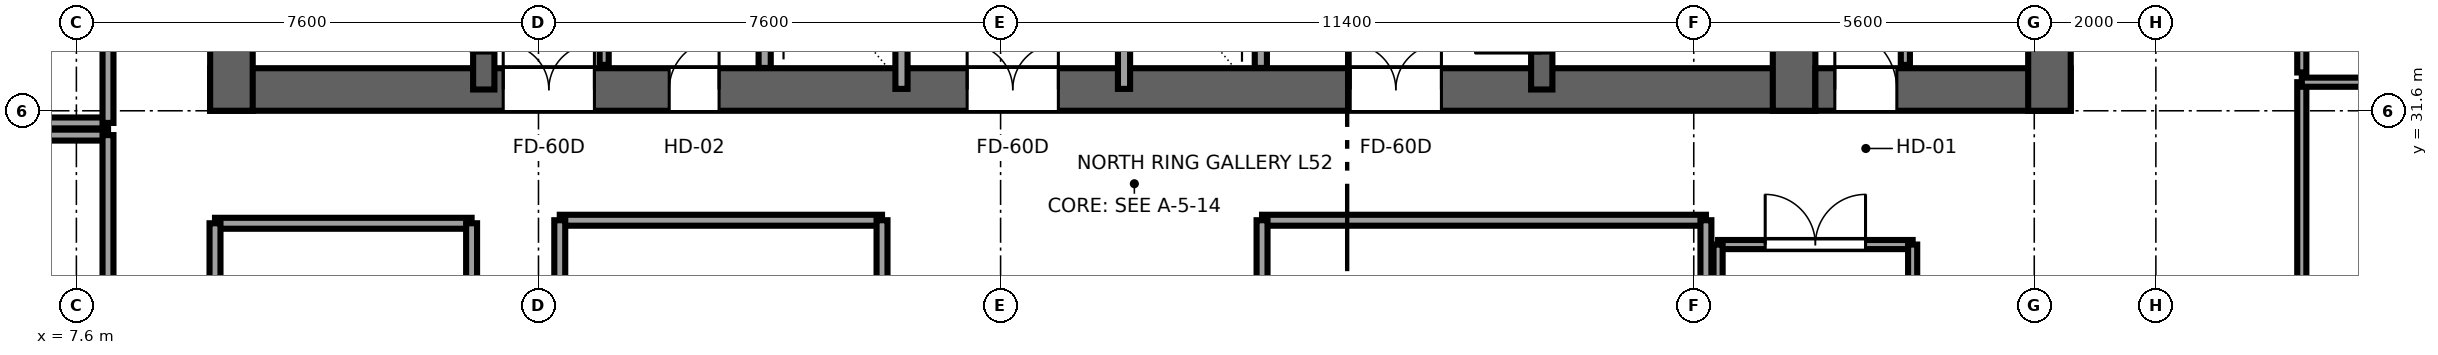
"""IFC4 building model, lengths in metres.
Left out: names, types, materials, properties, quantities, classifications, styles, units other than length and angle.
Written with IfcOpenShell. Run it as: python <this file> out.ifc"""

import sys

from ifc_helpers import new_model, si_unit, direction, frame, frame_2d, origin, place, context, subcontext, project, spatial, rectangle, extrude, source, transform, mapped, element, fill, save


model = new_model("IFC4")
c1 = context("Model", 3, precision=1e-05, world=origin(), true_north=direction((0.0, 1.0)))
c2 = subcontext(c1, "Body", "Model", "MODEL_VIEW")
j1 = project(units=[si_unit("LENGTHUNIT", "METRE"), si_unit("PLANEANGLEUNIT", "RADIAN")], contexts=[c1])
p1 = place(None, origin())
s1 = spatial("IfcSite", under=j1, at=p1, CompositionType="ELEMENT")
p2 = place(p1, origin())
s2 = spatial("IfcBuilding", under=s1, at=p2, CompositionType="ELEMENT")
p3 = place(p2, frame((0.0, 0.0, 198.2)))
s3 = spatial("IfcBuildingStorey", under=s2, at=p3, CompositionType="ELEMENT", Elevation=198.2)
p4 = place(p3, frame((9.8, 31.95, 0.0), z_axis=(0.0, 0.0, 1.0), x_axis=(1.0, 0.0, 0.0)))
e1 = element("IfcWall", 1, at=p4, inside=s3, PredefinedType="SHEAR", context=c2, shape_type="SweptSolid", body=[
    extrude(rectangle(XDim=26.4, YDim=0.7, at=frame_2d((13.2, 0.0))), origin(), (0.0, 0.0, 1.0), 3.55),
])
p5 = place(p4, frame((6.32, 0.0, 0.0), z_axis=(0.0, 0.0, 1.0), x_axis=(-1.0, 0.0, 0.0)))
e2 = element("IfcOpeningElement", 2, at=p5, cuts=e1, PredefinedType="OPENING", context=c2, shape_type="SweptSolid", body=[
    extrude(rectangle(XDim=1.5, YDim=2.04, at=frame_2d((0.75, 1.02))), frame((0.0, 0.36, 0.0), z_axis=(0.0, -1.0, 0.0), x_axis=(1.0, 0.0, 0.0)), (0.0, 0.0, 1.0), 0.72),
])
p6 = place(p4, frame((13.95, 0.0, 0.0), z_axis=(0.0, 0.0, 1.0), x_axis=(-1.0, 0.0, 0.0)))
e3 = element("IfcOpeningElement", 3, at=p6, cuts=e1, PredefinedType="OPENING", context=c2, shape_type="SweptSolid", body=[
    extrude(rectangle(XDim=1.5, YDim=2.04, at=frame_2d((0.75, 1.02))), frame((0.0, 0.36, 0.0), z_axis=(0.0, -1.0, 0.0), x_axis=(1.0, 0.0, 0.0)), (0.0, 0.0, 1.0), 0.72),
])
p7 = place(p4, frame((20.25, 0.0, 0.0), z_axis=(0.0, 0.0, 1.0), x_axis=(-1.0, 0.0, 0.0)))
e4 = element("IfcOpeningElement", 4, at=p7, cuts=e1, PredefinedType="OPENING", context=c2, shape_type="SweptSolid", body=[
    extrude(rectangle(XDim=1.5, YDim=2.04, at=frame_2d((0.75, 1.02))), frame((0.0, 0.36, 0.0), z_axis=(0.0, -1.0, 0.0), x_axis=(1.0, 0.0, 0.0)), (0.0, 0.0, 1.0), 0.72),
])
p8 = place(p4, frame((8.37, 0.0, 0.0), z_axis=(0.0, 0.0, 1.0), x_axis=(-1.0, 0.0, 0.0)))
e5 = element("IfcOpeningElement", 5, at=p8, cuts=e1, PredefinedType="OPENING", context=c2, shape_type="SweptSolid", body=[
    extrude(rectangle(XDim=0.82, YDim=2.01, at=frame_2d((0.41, 1.005))), frame((0.0, 0.36, 0.0), z_axis=(0.0, -1.0, 0.0), x_axis=(1.0, 0.0, 0.0)), (0.0, 0.0, 1.0), 0.72),
])
for number, where, z_axis, x_axis in (
    (6, (10.15, 31.6, 0.0), (0.0, 0.0, 1.0), (0.0, 1.0, 0.0)),
    (7, (35.85, 31.6, 0.0), (0.0, 0.0, 1.0), (0.0, 1.0, 0.0)),
):
    element("IfcWall", number, at=place(p3, frame(where, z_axis=z_axis, x_axis=x_axis)), inside=s3, PredefinedType="SHEAR", context=c2, shape_type="SweptSolid", body=[
        extrude(rectangle(XDim=13.6, YDim=0.7, at=frame_2d((6.8, 0.0))), origin(), (0.0, 0.0, 1.0), 3.55),
    ])
p9 = place(p3, frame((14.3, 31.95, 0.0), z_axis=(0.0, 0.0, 1.0), x_axis=(0.0, 1.0, 0.0)))
e8 = element("IfcWall", 8, at=p9, inside=s3, PredefinedType="SHEAR", context=c2, shape_type="SweptSolid", body=[
    extrude(rectangle(XDim=12.9, YDim=0.35, at=frame_2d((6.45, 0.0))), origin(), (0.0, 0.0, 1.0), 3.55),
])
p10 = place(p9, frame((0.6, 0.0, 0.0)))
e9 = element("IfcOpeningElement", 9, at=p10, cuts=e8, PredefinedType="OPENING", context=c2, shape_type="SweptSolid", body=[
    extrude(rectangle(XDim=1.1, YDim=2.12, at=frame_2d((0.55, 1.06))), frame((0.0, 0.185, 0.0), z_axis=(0.0, -1.0, 0.0), x_axis=(1.0, 0.0, 0.0)), (0.0, 0.0, 1.0), 0.37),
])
p11 = place(p3, frame((31.7, 31.95, 0.0), z_axis=(0.0, 0.0, 1.0), x_axis=(0.0, 1.0, 0.0)))
e10 = element("IfcWall", 10, at=p11, inside=s3, PredefinedType="SHEAR", context=c2, shape_type="SweptSolid", body=[
    extrude(rectangle(XDim=12.9, YDim=0.35, at=frame_2d((6.45, 0.0))), origin(), (0.0, 0.0, 1.0), 3.55),
])
p12 = place(p11, frame((1.7, 0.0, 0.0), z_axis=(0.0, 0.0, 1.0), x_axis=(-1.0, 0.0, 0.0)))
e11 = element("IfcOpeningElement", 11, at=p12, cuts=e10, PredefinedType="OPENING", context=c2, shape_type="SweptSolid", body=[
    extrude(rectangle(XDim=1.1, YDim=2.12, at=frame_2d((0.55, 1.06))), frame((0.0, 0.185, 0.0), z_axis=(0.0, -1.0, 0.0), x_axis=(1.0, 0.0, 0.0)), (0.0, 0.0, 1.0), 0.37),
])
p13 = place(p3, frame((36.2, 31.95, 0.0), z_axis=(0.0, 0.0, 1.0), x_axis=(1.0, 0.0, 0.0)))
e12 = element("IfcWall", 12, at=p13, inside=s3, PredefinedType="SHEAR", context=c2, shape_type="SweptSolid", body=[
    extrude(rectangle(XDim=4.2, YDim=0.7, at=frame_2d((2.1, 0.0))), origin(), (0.0, 0.0, 1.0), 3.55),
])
p14 = place(p13, frame((1.34, 0.0, 0.0), z_axis=(0.0, 0.0, 1.0), x_axis=(-1.0, 0.0, 0.0)))
e13 = element("IfcOpeningElement", 13, at=p14, cuts=e12, PredefinedType="OPENING", context=c2, shape_type="SweptSolid", body=[
    extrude(rectangle(XDim=1.02, YDim=2.03, at=frame_2d((0.51, 1.015))), frame((0.0, 0.36, 0.0), z_axis=(0.0, -1.0, 0.0), x_axis=(1.0, 0.0, 0.0)), (0.0, 0.0, 1.0), 0.72),
])
p15 = place(p3, frame((40.05, 31.6, 0.0), z_axis=(0.0, 0.0, 1.0), x_axis=(0.0, 1.0, 0.0)))
e14 = element("IfcWall", 14, at=p15, inside=s3, PredefinedType="SHEAR", context=c2, shape_type="SweptSolid", body=[
    extrude(rectangle(XDim=13.6, YDim=0.7, at=frame_2d((6.8, 0.0))), origin(), (0.0, 0.0, 1.0), 3.55),
])
for number, where, z_axis, x_axis in (
    (15, (18.92, 32.304, 0.0), (0.0, 0.0, 1.0), (0.0, 1.0, 0.0)),
    (16, (27.08, 32.304, 0.0), (0.0, 0.0, 1.0), (0.0, 1.0, 0.0)),
):
    element("IfcWall", number, at=place(p3, frame(where, z_axis=z_axis, x_axis=x_axis)), inside=s3, PredefinedType="SOLIDWALL", context=c2, shape_type="SweptSolid", body=[
        extrude(rectangle(XDim=3.846, YDim=0.2, at=frame_2d((1.923, 0.0))), origin(), (0.0, 0.0, 1.0), 3.37),
    ])
p16 = place(p3, frame((21.17, 31.96, 0.0), z_axis=(0.0, 0.0, 1.0), x_axis=(0.0, 1.0, 0.0)))
e17 = element("IfcWall", 17, at=p16, inside=s3, PredefinedType="SOLIDWALL", context=c2, shape_type="SweptSolid", body=[
    extrude(rectangle(XDim=12.58, YDim=0.2, at=frame_2d((6.29, 0.0))), origin(), (0.0, 0.0, 1.0), 3.37),
])
p17 = place(p16, frame((5.74, 0.0, 0.0)))
e18 = element("IfcOpeningElement", 18, at=p17, cuts=e17, PredefinedType="OPENING", context=c2, shape_type="SweptSolid", body=[
    extrude(rectangle(XDim=1.1, YDim=2.12, at=frame_2d((0.55, 1.06))), frame((0.0, 0.11, 0.0), z_axis=(0.0, -1.0, 0.0), x_axis=(1.0, 0.0, 0.0)), (0.0, 0.0, 1.0), 0.22),
])
p18 = place(p16, frame((8.24, 0.0, 0.0)))
e19 = element("IfcOpeningElement", 19, at=p18, cuts=e17, PredefinedType="OPENING", context=c2, shape_type="SweptSolid", body=[
    extrude(rectangle(XDim=1.1, YDim=2.12, at=frame_2d((0.55, 1.06))), frame((0.0, 0.11, 0.0), z_axis=(0.0, -1.0, 0.0), x_axis=(1.0, 0.0, 0.0)), (0.0, 0.0, 1.0), 0.22),
])
p19 = place(p3, frame((24.83, 31.96, 0.0), z_axis=(0.0, 0.0, 1.0), x_axis=(0.0, 1.0, 0.0)))
e20 = element("IfcWall", 20, at=p19, inside=s3, PredefinedType="SOLIDWALL", context=c2, shape_type="SweptSolid", body=[
    extrude(rectangle(XDim=12.58, YDim=0.2, at=frame_2d((6.29, 0.0))), origin(), (0.0, 0.0, 1.0), 3.37),
])
p20 = place(p19, frame((5.74, 0.0, 0.0)))
e21 = element("IfcOpeningElement", 21, at=p20, cuts=e20, PredefinedType="OPENING", context=c2, shape_type="SweptSolid", body=[
    extrude(rectangle(XDim=1.1, YDim=2.12, at=frame_2d((0.55, 1.06))), frame((0.0, 0.11, 0.0), z_axis=(0.0, -1.0, 0.0), x_axis=(1.0, 0.0, 0.0)), (0.0, 0.0, 1.0), 0.22),
])
p21 = place(p19, frame((8.24, 0.0, 0.0)))
e22 = element("IfcOpeningElement", 22, at=p21, cuts=e20, PredefinedType="OPENING", context=c2, shape_type="SweptSolid", body=[
    extrude(rectangle(XDim=1.1, YDim=2.12, at=frame_2d((0.55, 1.06))), frame((0.0, 0.11, 0.0), z_axis=(0.0, -1.0, 0.0), x_axis=(1.0, 0.0, 0.0)), (0.0, 0.0, 1.0), 0.22),
])
p22 = place(p3, frame((16.28, 32.355, 0.0), z_axis=(0.0, 0.0, 1.0), x_axis=(0.0, 1.0, 0.0)))
e23 = element("IfcWall", 23, at=p22, inside=s3, PredefinedType="PARTITIONING", context=c2, shape_type="SweptSolid", body=[
    extrude(rectangle(XDim=0.865, YDim=0.15, at=frame_2d((0.433, 0.0))), origin(), (0.0, 0.0, 1.0), 3.37),
])
p23 = place(p3, frame((37.68, 32.355, 0.0), z_axis=(0.0, 0.0, 1.0), x_axis=(0.0, 1.0, 0.0)))
e24 = element("IfcWall", 24, at=p23, inside=s3, PredefinedType="PARTITIONING", context=c2, shape_type="SweptSolid", body=[
    extrude(rectangle(XDim=3.845, YDim=0.15, at=frame_2d((1.922, 0.0))), origin(), (0.0, 0.0, 1.0), 3.37),
])
p24 = place(p23, frame((1.413, 0.0, 0.0)))
e25 = element("IfcOpeningElement", 25, at=p24, cuts=e24, PredefinedType="OPENING", context=c2, shape_type="SweptSolid", body=[
    extrude(rectangle(XDim=1.02, YDim=2.03, at=frame_2d((0.51, 1.015))), frame((0.0, 0.085, 0.0), z_axis=(0.0, -1.0, 0.0), x_axis=(1.0, 0.0, 0.0)), (0.0, 0.0, 1.0), 0.17),
])
p25 = place(p3, frame((2.9, 31.2, 0.0), z_axis=(0.0, 0.0, 1.0), x_axis=(1.0, 0.0, 0.0)))
e26 = element("IfcWall", 26, at=p25, inside=s3, PredefinedType="PARTITIONING", context=c2, shape_type="SweptSolid", body=[
    extrude(rectangle(XDim=5.22, YDim=0.18, at=frame_2d((2.61, 0.0))), origin(), (0.0, 0.0, 1.0), 3.37),
])
p26 = place(p3, frame((8.12, 23.7, 0.0), z_axis=(0.0, 0.0, 1.0), x_axis=(0.0, 1.0, 0.0)))
e27 = element("IfcWall", 27, at=p26, inside=s3, PredefinedType="PARTITIONING", context=c2, shape_type="SweptSolid", body=[
    extrude(rectangle(XDim=7.5, YDim=0.18, at=frame_2d((3.75, 0.0))), origin(), (0.0, 0.0, 1.0), 3.37),
])
p27 = place(p26, frame((2.925, 0.0, 0.0)))
e28 = element("IfcOpeningElement", 28, at=p27, cuts=e27, PredefinedType="OPENING", context=c2, shape_type="SweptSolid", body=[
    extrude(rectangle(XDim=1.65, YDim=2.15, at=frame_2d((0.825, 1.075))), frame((0.0, 0.1, 0.0), z_axis=(0.0, -1.0, 0.0), x_axis=(1.0, 0.0, 0.0)), (0.0, 0.0, 1.0), 0.2),
])
p28 = place(p3, frame((2.9, 31.4, 0.0), z_axis=(0.0, 0.0, 1.0), x_axis=(1.0, 0.0, 0.0)))
e29 = element("IfcWall", 29, at=p28, inside=s3, PredefinedType="PARTITIONING", context=c2, shape_type="SweptSolid", body=[
    extrude(rectangle(XDim=5.22, YDim=0.18, at=frame_2d((2.61, 0.0))), origin(), (0.0, 0.0, 1.0), 3.37),
])
p29 = place(p3, frame((8.12, 31.4, 0.0), z_axis=(0.0, 0.0, 1.0), x_axis=(0.0, 1.0, 0.0)))
e30 = element("IfcWall", 30, at=p29, inside=s3, PredefinedType="PARTITIONING", context=c2, shape_type="SweptSolid", body=[
    extrude(rectangle(XDim=6.8, YDim=0.18, at=frame_2d((3.4, 0.0))), origin(), (0.0, 0.0, 1.0), 3.37),
])
p30 = place(p29, frame((3.175, 0.0, 0.0)))
e31 = element("IfcOpeningElement", 31, at=p30, cuts=e30, PredefinedType="OPENING", context=c2, shape_type="SweptSolid", body=[
    extrude(rectangle(XDim=1.65, YDim=2.15, at=frame_2d((0.825, 1.075))), frame((0.0, 0.1, 0.0), z_axis=(0.0, -1.0, 0.0), x_axis=(1.0, 0.0, 0.0)), (0.0, 0.0, 1.0), 0.2),
])
p31 = place(p3, frame((44.2, 23.78, 0.0), z_axis=(0.0, 0.0, 1.0), x_axis=(0.0, 1.0, 0.0)))
e32 = element("IfcWall", 32, at=p31, inside=s3, PredefinedType="PARTITIONING", context=c2, shape_type="SweptSolid", body=[
    extrude(rectangle(XDim=8.29, YDim=0.15, at=frame_2d((4.145, 0.0))), origin(), (0.0, 0.0, 1.0), 3.37),
])
p32 = place(p31, frame((3.655, 0.0, 0.0)))
e33 = element("IfcOpeningElement", 33, at=p32, cuts=e32, PredefinedType="OPENING", context=c2, shape_type="SweptSolid", body=[
    extrude(rectangle(XDim=0.98, YDim=2.12, at=frame_2d((0.49, 1.06))), frame((0.0, 0.085, 0.0), z_axis=(0.0, -1.0, 0.0), x_axis=(1.0, 0.0, 0.0)), (0.0, 0.0, 1.0), 0.17),
])
p33 = place(p3, frame((44.2, 32.07, 0.0), z_axis=(0.0, 0.0, 1.0), x_axis=(1.0, 0.0, 0.0)))
e34 = element("IfcWall", 34, at=p33, inside=s3, PredefinedType="PARTITIONING", context=c2, shape_type="SweptSolid", body=[
    extrude(rectangle(XDim=7.43, YDim=0.15, at=frame_2d((3.715, 0.0))), origin(), (0.0, 0.0, 1.0), 3.37),
])
p34 = place(p3, frame((44.2, 32.23, 0.0), z_axis=(0.0, 0.0, 1.0), x_axis=(0.0, 1.0, 0.0)))
e35 = element("IfcWall", 35, at=p34, inside=s3, PredefinedType="PARTITIONING", context=c2, shape_type="SweptSolid", body=[
    extrude(rectangle(XDim=8.29, YDim=0.15, at=frame_2d((4.145, 0.0))), origin(), (0.0, 0.0, 1.0), 3.37),
])
p35 = place(p34, frame((3.655, 0.0, 0.0)))
e36 = element("IfcOpeningElement", 36, at=p35, cuts=e35, PredefinedType="OPENING", context=c2, shape_type="SweptSolid", body=[
    extrude(rectangle(XDim=0.98, YDim=2.12, at=frame_2d((0.49, 1.06))), frame((0.0, 0.085, 0.0), z_axis=(0.0, -1.0, 0.0), x_axis=(1.0, 0.0, 0.0)), (0.0, 0.0, 1.0), 0.17),
])
p36 = place(p3, frame((9.88, 29.75, 0.0), z_axis=(0.0, 0.0, 1.0), x_axis=(1.0, 0.0, 0.0)))
e37 = element("IfcWall", 37, at=p36, inside=s3, PredefinedType="PARTITIONING", context=c2, shape_type="SweptSolid", body=[
    extrude(rectangle(XDim=4.22, YDim=0.18, at=frame_2d((2.11, 0.0))), origin(), (0.0, 0.0, 1.0), 3.37),
])
for number, where, z_axis, x_axis in (
    (38, (9.88, 23.7, 0.0), (0.0, 0.0, 1.0), (0.0, 1.0, 0.0)),
    (39, (14.1, 23.7, 0.0), (0.0, 0.0, 1.0), (0.0, 1.0, 0.0)),
):
    element("IfcWall", number, at=place(p3, frame(where, z_axis=z_axis, x_axis=x_axis)), inside=s3, PredefinedType="PARTITIONING", context=c2, shape_type="SweptSolid", body=[
        extrude(rectangle(XDim=6.05, YDim=0.18, at=frame_2d((3.025, 0.0))), origin(), (0.0, 0.0, 1.0), 3.37),
    ])
p37 = place(p3, frame((27.1, 29.8, 0.0), z_axis=(0.0, 0.0, 1.0), x_axis=(1.0, 0.0, 0.0)))
e40 = element("IfcWall", 40, at=p37, inside=s3, PredefinedType="PARTITIONING", context=c2, shape_type="SweptSolid", body=[
    extrude(rectangle(XDim=7.3, YDim=0.18, at=frame_2d((3.65, 0.0))), origin(), (0.0, 0.0, 1.0), 3.37),
])
for number, where, z_axis, x_axis in (
    (41, (27.1, 23.7, 0.0), (0.0, 0.0, 1.0), (0.0, 1.0, 0.0)),
    (42, (34.4, 23.7, 0.0), (0.0, 0.0, 1.0), (0.0, 1.0, 0.0)),
):
    element("IfcWall", number, at=place(p3, frame(where, z_axis=z_axis, x_axis=x_axis)), inside=s3, PredefinedType="PARTITIONING", context=c2, shape_type="SweptSolid", body=[
        extrude(rectangle(XDim=6.1, YDim=0.18, at=frame_2d((3.05, 0.0))), origin(), (0.0, 0.0, 1.0), 3.37),
    ])
p38 = place(p3, frame((15.55, 29.8, 0.0), z_axis=(0.0, 0.0, 1.0), x_axis=(1.0, 0.0, 0.0)))
e43 = element("IfcWall", 43, at=p38, inside=s3, PredefinedType="PARTITIONING", context=c2, shape_type="SweptSolid", body=[
    extrude(rectangle(XDim=5.3, YDim=0.18, at=frame_2d((2.65, 0.0))), origin(), (0.0, 0.0, 1.0), 3.37),
])
for number, where, z_axis, x_axis in (
    (44, (15.55, 23.7, 0.0), (0.0, 0.0, 1.0), (0.0, 1.0, 0.0)),
    (45, (20.85, 23.7, 0.0), (0.0, 0.0, 1.0), (0.0, 1.0, 0.0)),
):
    element("IfcWall", number, at=place(p3, frame(where, z_axis=z_axis, x_axis=x_axis)), inside=s3, PredefinedType="PARTITIONING", context=c2, shape_type="SweptSolid", body=[
        extrude(rectangle(XDim=6.1, YDim=0.18, at=frame_2d((3.05, 0.0))), origin(), (0.0, 0.0, 1.0), 3.37),
    ])
p39 = place(p3, frame((34.6, 29.4, 0.0), z_axis=(0.0, 0.0, 1.0), x_axis=(1.0, 0.0, 0.0)))
e46 = element("IfcWall", 46, at=p39, inside=s3, PredefinedType="PARTITIONING", context=c2, shape_type="SweptSolid", body=[
    extrude(rectangle(XDim=3.2, YDim=0.15, at=frame_2d((1.6, 0.0))), origin(), (0.0, 0.0, 1.0), 3.37),
])
p40 = place(p39, frame((0.775, 0.0, 0.0)))
e47 = element("IfcOpeningElement", 47, at=p40, cuts=e46, PredefinedType="OPENING", context=c2, shape_type="SweptSolid", body=[
    extrude(rectangle(XDim=1.65, YDim=2.15, at=frame_2d((0.825, 1.075))), frame((0.0, 0.085, 0.0), z_axis=(0.0, -1.0, 0.0), x_axis=(1.0, 0.0, 0.0)), (0.0, 0.0, 1.0), 0.17),
])
for number, where, z_axis, x_axis in (
    (48, (34.6, 23.7, 0.0), (0.0, 0.0, 1.0), (0.0, 1.0, 0.0)),
    (49, (37.8, 23.7, 0.0), (0.0, 0.0, 1.0), (0.0, 1.0, 0.0)),
):
    element("IfcWall", number, at=place(p3, frame(where, z_axis=z_axis, x_axis=x_axis)), inside=s3, PredefinedType="PARTITIONING", context=c2, shape_type="SweptSolid", body=[
        extrude(rectangle(XDim=5.7, YDim=0.15, at=frame_2d((2.85, 0.0))), origin(), (0.0, 0.0, 1.0), 3.37),
    ])
m1 = source(origin(), c2, "Body", "SweptSolid", [
    extrude(rectangle(XDim=1.1, YDim=2.12, at=frame_2d((0.55, 1.06))), frame((0.0, 0.025, 0.0), z_axis=(0.0, -1.0, 0.0), x_axis=(1.0, 0.0, 0.0)), (0.0, 0.0, 1.0), 0.05),
])
p41 = place(p10, origin())
e50 = element("IfcDoor", 50, at=p41, inside=s3, OperationType="SINGLE_SWING_RIGHT", PredefinedType="DOOR", context=c2, shape_type="MappedRepresentation", body=[
    mapped(m1, transform((0.0, 0.0, 0.0), x_axis=(1.0, 0.0, 0.0), y_axis=(0.0, 1.0, 0.0), z_axis=(0.0, 0.0, 1.0), scale=1.0)),
])
fill(e9, e50)
p42 = place(p12, origin())
e51 = element("IfcDoor", 51, at=p42, inside=s3, OperationType="SINGLE_SWING_LEFT", PredefinedType="DOOR", context=c2, shape_type="MappedRepresentation", body=[
    mapped(m1, transform((0.0, 0.0, 0.0), x_axis=(1.0, 0.0, 0.0), y_axis=(0.0, 1.0, 0.0), z_axis=(0.0, 0.0, 1.0), scale=1.0)),
])
fill(e11, e51)
m2 = source(origin(), c2, "Body", "SweptSolid", [
    extrude(rectangle(XDim=1.5, YDim=2.04, at=frame_2d((0.75, 1.02))), frame((0.0, 0.025, 0.0), z_axis=(0.0, -1.0, 0.0), x_axis=(1.0, 0.0, 0.0)), (0.0, 0.0, 1.0), 0.05),
])
p43 = place(p5, origin())
e52 = element("IfcDoor", 52, at=p43, inside=s3, OperationType="DOUBLE_DOOR_SINGLE_SWING", PredefinedType="DOOR", context=c2, shape_type="MappedRepresentation", body=[
    mapped(m2, transform((0.0, 0.0, 0.0), x_axis=(1.0, 0.0, 0.0), y_axis=(0.0, 1.0, 0.0), z_axis=(0.0, 0.0, 1.0), scale=1.0)),
])
fill(e2, e52)
p44 = place(p6, origin())
e53 = element("IfcDoor", 53, at=p44, inside=s3, OperationType="DOUBLE_DOOR_SINGLE_SWING", PredefinedType="DOOR", context=c2, shape_type="MappedRepresentation", body=[
    mapped(m2, transform((0.0, 0.0, 0.0), x_axis=(1.0, 0.0, 0.0), y_axis=(0.0, 1.0, 0.0), z_axis=(0.0, 0.0, 1.0), scale=1.0)),
])
fill(e3, e53)
p45 = place(p7, origin())
e54 = element("IfcDoor", 54, at=p45, inside=s3, OperationType="DOUBLE_DOOR_SINGLE_SWING", PredefinedType="DOOR", context=c2, shape_type="MappedRepresentation", body=[
    mapped(m2, transform((0.0, 0.0, 0.0), x_axis=(1.0, 0.0, 0.0), y_axis=(0.0, 1.0, 0.0), z_axis=(0.0, 0.0, 1.0), scale=1.0)),
])
fill(e4, e54)
m3 = source(origin(), c2, "Body", "SweptSolid", [
    extrude(rectangle(XDim=0.82, YDim=2.01, at=frame_2d((0.41, 1.005))), frame((0.0, 0.025, 0.0), z_axis=(0.0, -1.0, 0.0), x_axis=(1.0, 0.0, 0.0)), (0.0, 0.0, 1.0), 0.05),
])
p46 = place(p8, origin())
e55 = element("IfcDoor", 55, at=p46, inside=s3, OperationType="SINGLE_SWING_RIGHT", PredefinedType="DOOR", context=c2, shape_type="MappedRepresentation", body=[
    mapped(m3, transform((0.0, 0.0, 0.0), x_axis=(1.0, 0.0, 0.0), y_axis=(0.0, 1.0, 0.0), z_axis=(0.0, 0.0, 1.0), scale=1.0)),
])
fill(e5, e55)
m4 = source(origin(), c2, "Body", "SweptSolid", [
    extrude(rectangle(XDim=1.02, YDim=2.03, at=frame_2d((0.51, 1.015))), frame((0.0, 0.025, 0.0), z_axis=(0.0, -1.0, 0.0), x_axis=(1.0, 0.0, 0.0)), (0.0, 0.0, 1.0), 0.05),
])
p47 = place(p14, origin())
e56 = element("IfcDoor", 56, at=p47, inside=s3, OperationType="SINGLE_SWING_LEFT", PredefinedType="DOOR", context=c2, shape_type="MappedRepresentation", body=[
    mapped(m4, transform((0.0, 0.0, 0.0), x_axis=(1.0, 0.0, 0.0), y_axis=(0.0, 1.0, 0.0), z_axis=(0.0, 0.0, 1.0), scale=1.0)),
])
fill(e13, e56)
m5 = source(origin(), c2, "Body", "SweptSolid", [
    extrude(rectangle(XDim=1.65, YDim=2.15, at=frame_2d((0.825, 1.075))), frame((0.0, 0.025, 0.0), z_axis=(0.0, -1.0, 0.0), x_axis=(1.0, 0.0, 0.0)), (0.0, 0.0, 1.0), 0.05),
])
p48 = place(p40, origin())
e57 = element("IfcDoor", 57, at=p48, inside=s3, OperationType="DOUBLE_DOOR_SINGLE_SWING", PredefinedType="DOOR", context=c2, shape_type="MappedRepresentation", body=[
    mapped(m5, transform((0.0, 0.0, 0.0), x_axis=(1.0, 0.0, 0.0), y_axis=(0.0, 1.0, 0.0), z_axis=(0.0, 0.0, 1.0), scale=1.0)),
])
fill(e47, e57)
save(model, sys.argv[1])
